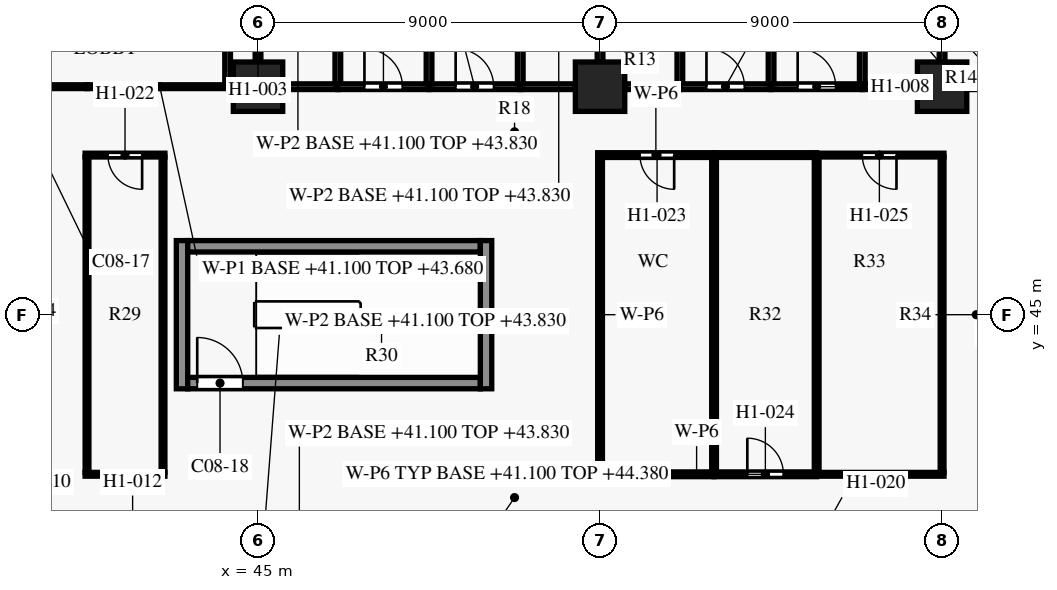
"""IFC4 building model, lengths in metres.
Left out: names, types, materials, properties, quantities, classifications, styles, units other than length and angle.
Written with IfcOpenShell. Run it as: python <this file> out.ifc"""

import sys

from ifc_helpers import new_model, si_unit, direction, frame, frame_2d, origin, origin_2d, place, context, subcontext, project, spatial, rectangle, extrude, element, fill, save


model = new_model("IFC4")
c1 = context("Model", 3, precision=1e-05, world=origin(), true_north=direction((0.0, 1.0)))
c2 = subcontext(c1, "Body", "Model", "MODEL_VIEW")
j1 = project(units=[si_unit("LENGTHUNIT", "METRE"), si_unit("PLANEANGLEUNIT", "RADIAN")], contexts=[c1])
p1 = place(None, origin())
s1 = spatial("IfcSite", under=j1, at=p1, CompositionType="ELEMENT")
p2 = place(p1, origin())
s2 = spatial("IfcBuilding", under=s1, at=p2, CompositionType="ELEMENT")
p3 = place(p2, frame((0.0, 0.0, 41.1)))
s3 = spatial("IfcBuildingStorey", under=s2, at=p3, CompositionType="ELEMENT", Elevation=41.1)
for number, where, z_axis, x_axis in (
    (1, (45.0, 51.0, 0.0), (0.0, 0.0, 1.0), (1.0, 0.0, 0.0)),
    (2, (54.0, 51.0, 0.0), (0.0, 0.0, 1.0), (1.0, 0.0, 0.0)),
    (3, (63.0, 51.0, 0.0), (0.0, 0.0, 1.0), (1.0, 0.0, 0.0)),
):
    element("IfcColumn", number, at=place(p3, frame(where, z_axis=z_axis, x_axis=x_axis)), inside=s3, PredefinedType="COLUMN", context=c2, shape_type="SweptSolid", body=[
        extrude(rectangle(XDim=1.3, YDim=1.3, at=origin_2d()), origin(), (0.0, 0.0, 1.0), 3.6),
    ])
p4 = place(p3, frame((43.15, 43.2, 0.0), z_axis=(0.0, 0.0, 1.0), x_axis=(1.0, 0.0, 0.0)))
e4 = element("IfcWall", 4, at=p4, inside=s3, PredefinedType="SHEAR", context=c2, shape_type="SweptSolid", body=[
    extrude(rectangle(XDim=7.7, YDim=0.3, at=frame_2d((3.85, 0.0))), origin(), (0.0, 0.0, 1.0), 3.3),
])
p5 = place(p4, frame((0.25, 0.0, 0.0)))
e5 = element("IfcOpeningElement", 5, at=p5, cuts=e4, PredefinedType="OPENING", context=c2, shape_type="SweptSolid", body=[
    extrude(rectangle(XDim=1.2, YDim=2.2, at=frame_2d((0.6, 1.1))), frame((0.0, 0.16, 0.0), z_axis=(0.0, -1.0, 0.0), x_axis=(1.0, 0.0, 0.0)), (0.0, 0.0, 1.0), 0.32),
])
p6 = place(p3, frame((43.15, 46.8, 0.0), z_axis=(0.0, 0.0, 1.0), x_axis=(1.0, 0.0, 0.0)))
e6 = element("IfcWall", 6, at=p6, inside=s3, PredefinedType="SHEAR", context=c2, shape_type="SweptSolid", body=[
    extrude(rectangle(XDim=7.7, YDim=0.3, at=frame_2d((3.85, 0.0))), origin(), (0.0, 0.0, 1.0), 3.3),
])
for number, where, z_axis, x_axis in (
    (7, (43.0, 43.05, 0.0), (0.0, 0.0, 1.0), (0.0, 1.0, 0.0)),
    (8, (51.0, 43.05, 0.0), (0.0, 0.0, 1.0), (0.0, 1.0, 0.0)),
):
    element("IfcWall", number, at=place(p3, frame(where, z_axis=z_axis, x_axis=x_axis)), inside=s3, PredefinedType="SHEAR", context=c2, shape_type="SweptSolid", body=[
        extrude(rectangle(XDim=3.9, YDim=0.3, at=frame_2d((1.95, 0.0))), origin(), (0.0, 0.0, 1.0), 3.3),
    ])
p7 = place(p3, frame((40.45, 40.8, 0.0), z_axis=(0.0, 0.0, 1.0), x_axis=(1.0, 0.0, 0.0)))
e9 = element("IfcWall", 9, at=p7, inside=s3, PredefinedType="PARTITIONING", context=c2, shape_type="SweptSolid", body=[
    extrude(rectangle(XDim=2.1, YDim=0.1, at=frame_2d((1.05, 0.0))), origin(), (0.0, 0.0, 1.0), 3.28),
])
p8 = place(p3, frame((53.938, 40.8, 0.0), z_axis=(0.0, 0.0, 1.0), x_axis=(1.0, 0.0, 0.0)))
e10 = element("IfcWall", 10, at=p8, inside=s3, PredefinedType="PARTITIONING", context=c2, shape_type="SweptSolid", body=[
    extrude(rectangle(XDim=3.062, YDim=0.125, at=frame_2d((1.531, 0.0))), origin(), (0.0, 0.0, 1.0), 2.73),
])
p9 = place(p3, frame((57.0, 40.8, 0.0), z_axis=(0.0, 0.0, 1.0), x_axis=(1.0, 0.0, 0.0)))
e11 = element("IfcWall", 11, at=p9, inside=s3, PredefinedType="PARTITIONING", context=c2, shape_type="SweptSolid", body=[
    extrude(rectangle(XDim=2.7, YDim=0.125, at=frame_2d((1.35, 0.0))), origin(), (0.0, 0.0, 1.0), 3.28),
])
p10 = place(p9, frame((0.875, 0.0, 0.0)))
e12 = element("IfcOpeningElement", 12, at=p10, cuts=e11, PredefinedType="OPENING", context=c2, shape_type="SweptSolid", body=[
    extrude(rectangle(XDim=0.95, YDim=2.1, at=frame_2d((0.475, 1.05))), frame((0.0, 0.073, 0.0), z_axis=(0.0, -1.0, 0.0), x_axis=(1.0, 0.0, 0.0)), (0.0, 0.0, 1.0), 0.145),
])
p11 = place(p3, frame((59.7, 40.8, 0.0), z_axis=(0.0, 0.0, 1.0), x_axis=(1.0, 0.0, 0.0)))
e13 = element("IfcWall", 13, at=p11, inside=s3, PredefinedType="PARTITIONING", context=c2, shape_type="SweptSolid", body=[
    extrude(rectangle(XDim=3.35, YDim=0.1, at=frame_2d((1.675, 0.0))), origin(), (0.0, 0.0, 1.0), 2.73),
])
p12 = place(p3, frame((63.0, 40.85, 0.0), z_axis=(0.0, 0.0, 1.0), x_axis=(0.0, 1.0, 0.0)))
e14 = element("IfcWall", 14, at=p12, inside=s3, PredefinedType="PARTITIONING", context=c2, shape_type="SweptSolid", body=[
    extrude(rectangle(XDim=8.3, YDim=0.1, at=frame_2d((4.15, 0.0))), origin(), (0.0, 0.0, 1.0), 2.73),
])
p13 = place(p3, frame((54.0, 49.137, 0.0), z_axis=(0.0, 0.0, 1.0), x_axis=(0.0, -1.0, 0.0)))
e15 = element("IfcWall", 15, at=p13, inside=s3, PredefinedType="PARTITIONING", context=c2, shape_type="SweptSolid", body=[
    extrude(rectangle(XDim=8.275, YDim=0.125, at=frame_2d((4.137, 0.0))), origin(), (0.0, 0.0, 1.0), 2.73),
])
for number, where, z_axis, x_axis in (
    (16, (57.0, 49.137, 0.0), (0.0, 0.0, 1.0), (0.0, -1.0, 0.0)),
    (17, (59.7, 49.137, 0.0), (0.0, 0.0, 1.0), (0.0, -1.0, 0.0)),
):
    element("IfcWall", number, at=place(p3, frame(where, z_axis=z_axis, x_axis=x_axis)), inside=s3, PredefinedType="PARTITIONING", context=c2, shape_type="SweptSolid", body=[
        extrude(rectangle(XDim=8.275, YDim=0.125, at=frame_2d((4.137, 0.0))), origin(), (0.0, 0.0, 1.0), 3.28),
    ])
for number, where, z_axis, x_axis in (
    (18, (40.5, 49.15, 0.0), (0.0, 0.0, 1.0), (0.0, -1.0, 0.0)),
    (19, (42.5, 49.15, 0.0), (0.0, 0.0, 1.0), (0.0, -1.0, 0.0)),
):
    element("IfcWall", number, at=place(p3, frame(where, z_axis=z_axis, x_axis=x_axis)), inside=s3, PredefinedType="PARTITIONING", context=c2, shape_type="SweptSolid", body=[
        extrude(rectangle(XDim=8.3, YDim=0.1, at=frame_2d((4.15, 0.0))), origin(), (0.0, 0.0, 1.0), 3.28),
    ])
p14 = place(p3, frame((42.55, 49.2, 0.0), z_axis=(0.0, 0.0, 1.0), x_axis=(-1.0, 0.0, 0.0)))
e20 = element("IfcWall", 20, at=p14, inside=s3, PredefinedType="PARTITIONING", context=c2, shape_type="SweptSolid", body=[
    extrude(rectangle(XDim=2.1, YDim=0.1, at=frame_2d((1.05, 0.0))), origin(), (0.0, 0.0, 1.0), 3.28),
])
p15 = place(p14, frame((0.6, 0.0, 0.0)))
e21 = element("IfcOpeningElement", 21, at=p15, cuts=e20, PredefinedType="OPENING", context=c2, shape_type="SweptSolid", body=[
    extrude(rectangle(XDim=0.9, YDim=2.1, at=frame_2d((0.45, 1.05))), frame((0.0, 0.06, 0.0), z_axis=(0.0, -1.0, 0.0), x_axis=(1.0, 0.0, 0.0)), (0.0, 0.0, 1.0), 0.12),
])
p16 = place(p3, frame((57.0, 49.2, 0.0), z_axis=(0.0, 0.0, 1.0), x_axis=(-1.0, 0.0, 0.0)))
e22 = element("IfcWall", 22, at=p16, inside=s3, PredefinedType="PARTITIONING", context=c2, shape_type="SweptSolid", body=[
    extrude(rectangle(XDim=3.062, YDim=0.125, at=frame_2d((1.531, 0.0))), origin(), (0.0, 0.0, 1.0), 2.73),
])
p17 = place(p16, frame((1.05, 0.0, 0.0)))
e23 = element("IfcOpeningElement", 23, at=p17, cuts=e22, PredefinedType="OPENING", context=c2, shape_type="SweptSolid", body=[
    extrude(rectangle(XDim=0.9, YDim=2.1, at=frame_2d((0.45, 1.05))), frame((0.0, 0.073, 0.0), z_axis=(0.0, -1.0, 0.0), x_axis=(1.0, 0.0, 0.0)), (0.0, 0.0, 1.0), 0.145),
])
p18 = place(p3, frame((59.7, 49.2, 0.0), z_axis=(0.0, 0.0, 1.0), x_axis=(-1.0, 0.0, 0.0)))
e24 = element("IfcWall", 24, at=p18, inside=s3, PredefinedType="PARTITIONING", context=c2, shape_type="SweptSolid", body=[
    extrude(rectangle(XDim=2.7, YDim=0.125, at=frame_2d((1.35, 0.0))), origin(), (0.0, 0.0, 1.0), 3.28),
])
p19 = place(p3, frame((63.05, 49.2, 0.0), z_axis=(0.0, 0.0, 1.0), x_axis=(-1.0, 0.0, 0.0)))
e25 = element("IfcWall", 25, at=p19, inside=s3, PredefinedType="PARTITIONING", context=c2, shape_type="SweptSolid", body=[
    extrude(rectangle(XDim=3.35, YDim=0.1, at=frame_2d((1.675, 0.0))), origin(), (0.0, 0.0, 1.0), 2.73),
])
p20 = place(p19, frame((1.25, 0.0, 0.0)))
e26 = element("IfcOpeningElement", 26, at=p20, cuts=e25, PredefinedType="OPENING", context=c2, shape_type="SweptSolid", body=[
    extrude(rectangle(XDim=0.9, YDim=2.1, at=frame_2d((0.45, 1.05))), frame((0.0, 0.06, 0.0), z_axis=(0.0, -1.0, 0.0), x_axis=(1.0, 0.0, 0.0)), (0.0, 0.0, 1.0), 0.12),
])
p21 = place(p3, frame((40.5, 51.0, 0.0), z_axis=(0.0, 0.0, 1.0), x_axis=(-1.0, 0.0, 0.0)))
e27 = element("IfcWall", 27, at=p21, inside=s3, PredefinedType="PARTITIONING", context=c2, shape_type="SweptSolid", body=[
    extrude(rectangle(XDim=3.845, YDim=0.1, at=frame_2d((1.922, 0.0))), origin(), (0.0, 0.0, 1.0), 2.58),
])
p22 = place(p21, frame((1.8, 0.0, 0.0)))
e28 = element("IfcOpeningElement", 28, at=p22, cuts=e27, PredefinedType="OPENING", context=c2, shape_type="SweptSolid", body=[
    extrude(rectangle(XDim=0.9, YDim=2.1, at=frame_2d((0.45, 1.05))), frame((0.0, 0.06, 0.0), z_axis=(0.0, -1.0, 0.0), x_axis=(1.0, 0.0, 0.0)), (0.0, 0.0, 1.0), 0.12),
])
p23 = place(p3, frame((44.33, 51.0, 0.0), z_axis=(0.0, 0.0, 1.0), x_axis=(-1.0, 0.0, 0.0)))
e29 = element("IfcWall", 29, at=p23, inside=s3, PredefinedType="PARTITIONING", context=c2, shape_type="SweptSolid", body=[
    extrude(rectangle(XDim=3.83, YDim=0.1, at=frame_2d((1.915, 0.0))), origin(), (0.0, 0.0, 1.0), 2.58),
])
p24 = place(p3, frame((45.655, 51.0, 0.0), z_axis=(0.0, 0.0, 1.0), x_axis=(1.0, 0.0, 0.0)))
e30 = element("IfcWall", 30, at=p24, inside=s3, PredefinedType="PARTITIONING", context=c2, shape_type="SweptSolid", body=[
    extrude(rectangle(XDim=1.445, YDim=0.15, at=frame_2d((0.723, 0.0))), origin(), (0.0, 0.0, 1.0), 2.58),
])
p25 = place(p3, frame((47.1, 51.0, 0.0), z_axis=(0.0, 0.0, 1.0), x_axis=(1.0, 0.0, 0.0)))
e31 = element("IfcWall", 31, at=p25, inside=s3, PredefinedType="PARTITIONING", context=c2, shape_type="SweptSolid", body=[
    extrude(rectangle(XDim=2.4, YDim=0.15, at=frame_2d((1.2, 0.0))), origin(), (0.0, 0.0, 1.0), 2.58),
])
p26 = place(p25, frame((0.7, 0.0, 0.0)))
e32 = element("IfcOpeningElement", 32, at=p26, cuts=e31, PredefinedType="OPENING", context=c2, shape_type="SweptSolid", body=[
    extrude(rectangle(XDim=1.0, YDim=2.1, at=frame_2d((0.5, 1.05))), frame((0.0, 0.085, 0.0), z_axis=(0.0, -1.0, 0.0), x_axis=(1.0, 0.0, 0.0)), (0.0, 0.0, 1.0), 0.17),
])
p27 = place(p3, frame((49.5, 51.0, 0.0), z_axis=(0.0, 0.0, 1.0), x_axis=(1.0, 0.0, 0.0)))
e33 = element("IfcWall", 33, at=p27, inside=s3, PredefinedType="PARTITIONING", context=c2, shape_type="SweptSolid", body=[
    extrude(rectangle(XDim=2.4, YDim=0.15, at=frame_2d((1.2, 0.0))), origin(), (0.0, 0.0, 1.0), 2.58),
])
p28 = place(p27, frame((0.7, 0.0, 0.0)))
e34 = element("IfcOpeningElement", 34, at=p28, cuts=e33, PredefinedType="OPENING", context=c2, shape_type="SweptSolid", body=[
    extrude(rectangle(XDim=1.0, YDim=2.1, at=frame_2d((0.5, 1.05))), frame((0.0, 0.085, 0.0), z_axis=(0.0, -1.0, 0.0), x_axis=(1.0, 0.0, 0.0)), (0.0, 0.0, 1.0), 0.17),
])
for number, where, z_axis, x_axis in (
    (35, (51.9, 51.0, 0.0), (0.0, 0.0, 1.0), (1.0, 0.0, 0.0)),
    (36, (54.655, 51.0, 0.0), (0.0, 0.0, 1.0), (1.0, 0.0, 0.0)),
):
    element("IfcWall", number, at=place(p3, frame(where, z_axis=z_axis, x_axis=x_axis)), inside=s3, PredefinedType="PARTITIONING", context=c2, shape_type="SweptSolid", body=[
        extrude(rectangle(XDim=1.445, YDim=0.15, at=frame_2d((0.723, 0.0))), origin(), (0.0, 0.0, 1.0), 2.58),
    ])
p29 = place(p3, frame((56.1, 51.0, 0.0), z_axis=(0.0, 0.0, 1.0), x_axis=(1.0, 0.0, 0.0)))
e37 = element("IfcWall", 37, at=p29, inside=s3, PredefinedType="PARTITIONING", context=c2, shape_type="SweptSolid", body=[
    extrude(rectangle(XDim=2.4, YDim=0.15, at=frame_2d((1.2, 0.0))), origin(), (0.0, 0.0, 1.0), 2.58),
])
p30 = place(p29, frame((0.7, 0.0, 0.0)))
e38 = element("IfcOpeningElement", 38, at=p30, cuts=e37, PredefinedType="OPENING", context=c2, shape_type="SweptSolid", body=[
    extrude(rectangle(XDim=1.0, YDim=2.1, at=frame_2d((0.5, 1.05))), frame((0.0, 0.085, 0.0), z_axis=(0.0, -1.0, 0.0), x_axis=(1.0, 0.0, 0.0)), (0.0, 0.0, 1.0), 0.17),
])
p31 = place(p3, frame((58.5, 51.0, 0.0), z_axis=(0.0, 0.0, 1.0), x_axis=(1.0, 0.0, 0.0)))
e39 = element("IfcWall", 39, at=p31, inside=s3, PredefinedType="PARTITIONING", context=c2, shape_type="SweptSolid", body=[
    extrude(rectangle(XDim=2.4, YDim=0.15, at=frame_2d((1.2, 0.0))), origin(), (0.0, 0.0, 1.0), 2.58),
])
p32 = place(p31, frame((0.7, 0.0, 0.0)))
e40 = element("IfcOpeningElement", 40, at=p32, cuts=e39, PredefinedType="OPENING", context=c2, shape_type="SweptSolid", body=[
    extrude(rectangle(XDim=1.0, YDim=2.1, at=frame_2d((0.5, 1.05))), frame((0.0, 0.085, 0.0), z_axis=(0.0, -1.0, 0.0), x_axis=(1.0, 0.0, 0.0)), (0.0, 0.0, 1.0), 0.17),
])
p33 = place(p3, frame((60.9, 51.0, 0.0), z_axis=(0.0, 0.0, 1.0), x_axis=(1.0, 0.0, 0.0)))
e41 = element("IfcWall", 41, at=p33, inside=s3, PredefinedType="PARTITIONING", context=c2, shape_type="SweptSolid", body=[
    extrude(rectangle(XDim=1.445, YDim=0.15, at=frame_2d((0.723, 0.0))), origin(), (0.0, 0.0, 1.0), 2.58),
])
p34 = place(p3, frame((63.655, 51.0, 0.0), z_axis=(0.0, 0.0, 1.0), x_axis=(1.0, 0.0, 0.0)))
e42 = element("IfcWall", 42, at=p34, inside=s3, PredefinedType="PARTITIONING", context=c2, shape_type="SweptSolid", body=[
    extrude(rectangle(XDim=1.22, YDim=0.15, at=frame_2d((0.61, 0.0))), origin(), (0.0, 0.0, 1.0), 2.58),
])
p35 = place(p3, frame((47.1, 51.075, 0.0), z_axis=(0.0, 0.0, 1.0), x_axis=(0.0, 1.0, 0.0)))
e43 = element("IfcWall", 43, at=p35, inside=s3, PredefinedType="PARTITIONING", context=c2, shape_type="SweptSolid", body=[
    extrude(rectangle(XDim=2.85, YDim=0.15, at=frame_2d((1.425, 0.0))), origin(), (0.0, 0.0, 1.0), 2.58),
])
p36 = place(p3, frame((56.1, 51.075, 0.0), z_axis=(0.0, 0.0, 1.0), x_axis=(0.0, 1.0, 0.0)))
e44 = element("IfcWall", 44, at=p36, inside=s3, PredefinedType="PARTITIONING", context=c2, shape_type="SweptSolid", body=[
    extrude(rectangle(XDim=2.85, YDim=0.15, at=frame_2d((1.425, 0.0))), origin(), (0.0, 0.0, 1.0), 2.58),
])
p37 = place(p36, frame((1.025, 0.0, 0.0)))
e45 = element("IfcOpeningElement", 45, at=p37, cuts=e44, PredefinedType="OPENING", context=c2, shape_type="SweptSolid", body=[
    extrude(rectangle(XDim=0.8, YDim=2.1, at=frame_2d((0.4, 1.05))), frame((0.0, 0.085, 0.0), z_axis=(0.0, -1.0, 0.0), x_axis=(1.0, 0.0, 0.0)), (0.0, 0.0, 1.0), 0.17),
])
p38 = place(p3, frame((44.2, 53.7, 0.0), z_axis=(0.0, 0.0, 1.0), x_axis=(0.0, -1.0, 0.0)))
e46 = element("IfcWall", 46, at=p38, inside=s3, PredefinedType="PARTITIONING", context=c2, shape_type="SweptSolid", body=[
    extrude(rectangle(XDim=2.625, YDim=0.15, at=frame_2d((1.312, 0.0))), origin(), (0.0, 0.0, 1.0), 2.58),
])
p39 = place(p3, frame((45.0, 53.925, 0.0), z_axis=(0.0, 0.0, 1.0), x_axis=(0.0, -1.0, 0.0)))
e47 = element("IfcWall", 47, at=p39, inside=s3, PredefinedType="PARTITIONING", context=c2, shape_type="SweptSolid", body=[
    extrude(rectangle(XDim=2.27, YDim=0.15, at=frame_2d((1.135, 0.0))), origin(), (0.0, 0.0, 1.0), 2.73),
])
p40 = place(p39, frame((1.025, 0.0, 0.0)))
e48 = element("IfcOpeningElement", 48, at=p40, cuts=e47, PredefinedType="OPENING", context=c2, shape_type="SweptSolid", body=[
    extrude(rectangle(XDim=0.8, YDim=2.1, at=frame_2d((0.4, 1.05))), frame((0.0, 0.085, 0.0), z_axis=(0.0, -1.0, 0.0), x_axis=(1.0, 0.0, 0.0)), (0.0, 0.0, 1.0), 0.17),
])
p41 = place(p3, frame((51.9, 53.925, 0.0), z_axis=(0.0, 0.0, 1.0), x_axis=(0.0, -1.0, 0.0)))
e49 = element("IfcWall", 49, at=p41, inside=s3, PredefinedType="PARTITIONING", context=c2, shape_type="SweptSolid", body=[
    extrude(rectangle(XDim=2.85, YDim=0.15, at=frame_2d((1.425, 0.0))), origin(), (0.0, 0.0, 1.0), 2.58),
])
p42 = place(p41, frame((1.025, 0.0, 0.0)))
e50 = element("IfcOpeningElement", 50, at=p42, cuts=e49, PredefinedType="OPENING", context=c2, shape_type="SweptSolid", body=[
    extrude(rectangle(XDim=0.8, YDim=2.1, at=frame_2d((0.4, 1.05))), frame((0.0, 0.085, 0.0), z_axis=(0.0, -1.0, 0.0), x_axis=(1.0, 0.0, 0.0)), (0.0, 0.0, 1.0), 0.17),
])
p43 = place(p3, frame((54.0, 53.925, 0.0), z_axis=(0.0, 0.0, 1.0), x_axis=(0.0, -1.0, 0.0)))
e51 = element("IfcWall", 51, at=p43, inside=s3, PredefinedType="PARTITIONING", context=c2, shape_type="SweptSolid", body=[
    extrude(rectangle(XDim=2.27, YDim=0.15, at=frame_2d((1.135, 0.0))), origin(), (0.0, 0.0, 1.0), 2.73),
])
p44 = place(p3, frame((60.9, 53.925, 0.0), z_axis=(0.0, 0.0, 1.0), x_axis=(0.0, -1.0, 0.0)))
e52 = element("IfcWall", 52, at=p44, inside=s3, PredefinedType="PARTITIONING", context=c2, shape_type="SweptSolid", body=[
    extrude(rectangle(XDim=2.85, YDim=0.15, at=frame_2d((1.425, 0.0))), origin(), (0.0, 0.0, 1.0), 2.58),
])
p45 = place(p44, frame((1.025, 0.0, 0.0)))
e53 = element("IfcOpeningElement", 53, at=p45, cuts=e52, PredefinedType="OPENING", context=c2, shape_type="SweptSolid", body=[
    extrude(rectangle(XDim=0.8, YDim=2.1, at=frame_2d((0.4, 1.05))), frame((0.0, 0.085, 0.0), z_axis=(0.0, -1.0, 0.0), x_axis=(1.0, 0.0, 0.0)), (0.0, 0.0, 1.0), 0.17),
])
p46 = place(p3, frame((63.0, 53.925, 0.0), z_axis=(0.0, 0.0, 1.0), x_axis=(0.0, -1.0, 0.0)))
e54 = element("IfcWall", 54, at=p46, inside=s3, PredefinedType="PARTITIONING", context=c2, shape_type="SweptSolid", body=[
    extrude(rectangle(XDim=2.27, YDim=0.15, at=frame_2d((1.135, 0.0))), origin(), (0.0, 0.0, 1.0), 2.73),
])
for number, where, z_axis, x_axis in (
    (55, (49.5, 62.425, 0.0), (0.0, 0.0, 1.0), (0.0, -1.0, 0.0)),
    (56, (58.5, 62.425, 0.0), (0.0, 0.0, 1.0), (0.0, -1.0, 0.0)),
):
    element("IfcWall", number, at=place(p3, frame(where, z_axis=z_axis, x_axis=x_axis)), inside=s3, PredefinedType="PARTITIONING", context=c2, shape_type="SweptSolid", body=[
        extrude(rectangle(XDim=11.35, YDim=0.15, at=frame_2d((5.675, 0.0))), origin(), (0.0, 0.0, 1.0), 2.58),
    ])
p47 = place(p5, origin())
e57 = element("IfcDoor", 57, at=p47, inside=s3, OperationType="SINGLE_SWING_RIGHT", PredefinedType="DOOR", context=c2, shape_type="SweptSolid", body=[
    extrude(rectangle(XDim=1.2, YDim=2.2, at=frame_2d((0.6, 1.1))), frame((0.0, 0.025, 0.0), z_axis=(0.0, -1.0, 0.0), x_axis=(1.0, 0.0, 0.0)), (0.0, 0.0, 1.0), 0.05),
])
fill(e5, e57)
p48 = place(p26, origin())
e58 = element("IfcDoor", 58, at=p48, inside=s3, OperationType="SINGLE_SWING_LEFT", PredefinedType="DOOR", context=c2, shape_type="SweptSolid", body=[
    extrude(rectangle(XDim=1.0, YDim=2.1, at=frame_2d((0.5, 1.05))), frame((0.0, 0.025, 0.0), z_axis=(0.0, -1.0, 0.0), x_axis=(1.0, 0.0, 0.0)), (0.0, 0.0, 1.0), 0.05),
])
fill(e32, e58)
p49 = place(p28, origin())
e59 = element("IfcDoor", 59, at=p49, inside=s3, OperationType="SINGLE_SWING_LEFT", PredefinedType="DOOR", context=c2, shape_type="SweptSolid", body=[
    extrude(rectangle(XDim=1.0, YDim=2.1, at=frame_2d((0.5, 1.05))), frame((0.0, 0.025, 0.0), z_axis=(0.0, -1.0, 0.0), x_axis=(1.0, 0.0, 0.0)), (0.0, 0.0, 1.0), 0.05),
])
fill(e34, e59)
p50 = place(p30, origin())
e60 = element("IfcDoor", 60, at=p50, inside=s3, OperationType="SINGLE_SWING_LEFT", PredefinedType="DOOR", context=c2, shape_type="SweptSolid", body=[
    extrude(rectangle(XDim=1.0, YDim=2.1, at=frame_2d((0.5, 1.05))), frame((0.0, 0.025, 0.0), z_axis=(0.0, -1.0, 0.0), x_axis=(1.0, 0.0, 0.0)), (0.0, 0.0, 1.0), 0.05),
])
fill(e38, e60)
p51 = place(p32, origin())
e61 = element("IfcDoor", 61, at=p51, inside=s3, OperationType="SINGLE_SWING_LEFT", PredefinedType="DOOR", context=c2, shape_type="SweptSolid", body=[
    extrude(rectangle(XDim=1.0, YDim=2.1, at=frame_2d((0.5, 1.05))), frame((0.0, 0.025, 0.0), z_axis=(0.0, -1.0, 0.0), x_axis=(1.0, 0.0, 0.0)), (0.0, 0.0, 1.0), 0.05),
])
fill(e40, e61)
p52 = place(p15, origin())
e62 = element("IfcDoor", 62, at=p52, inside=s3, OperationType="SINGLE_SWING_LEFT", PredefinedType="DOOR", context=c2, shape_type="SweptSolid", body=[
    extrude(rectangle(XDim=0.9, YDim=2.1, at=frame_2d((0.45, 1.05))), frame((0.0, 0.025, 0.0), z_axis=(0.0, -1.0, 0.0), x_axis=(1.0, 0.0, 0.0)), (0.0, 0.0, 1.0), 0.05),
])
fill(e21, e62)
p53 = place(p17, origin())
e63 = element("IfcDoor", 63, at=p53, inside=s3, OperationType="SINGLE_SWING_LEFT", PredefinedType="DOOR", context=c2, shape_type="SweptSolid", body=[
    extrude(rectangle(XDim=0.9, YDim=2.1, at=frame_2d((0.45, 1.05))), frame((0.0, 0.025, 0.0), z_axis=(0.0, -1.0, 0.0), x_axis=(1.0, 0.0, 0.0)), (0.0, 0.0, 1.0), 0.05),
])
fill(e23, e63)
p54 = place(p10, origin())
e64 = element("IfcDoor", 64, at=p54, inside=s3, OperationType="SINGLE_SWING_LEFT", PredefinedType="DOOR", context=c2, shape_type="SweptSolid", body=[
    extrude(rectangle(XDim=0.95, YDim=2.1, at=frame_2d((0.475, 1.05))), frame((0.0, 0.025, 0.0), z_axis=(0.0, -1.0, 0.0), x_axis=(1.0, 0.0, 0.0)), (0.0, 0.0, 1.0), 0.05),
])
fill(e12, e64)
p55 = place(p20, origin())
e65 = element("IfcDoor", 65, at=p55, inside=s3, OperationType="SINGLE_SWING_LEFT", PredefinedType="DOOR", context=c2, shape_type="SweptSolid", body=[
    extrude(rectangle(XDim=0.9, YDim=2.1, at=frame_2d((0.45, 1.05))), frame((0.0, 0.025, 0.0), z_axis=(0.0, -1.0, 0.0), x_axis=(1.0, 0.0, 0.0)), (0.0, 0.0, 1.0), 0.05),
])
fill(e26, e65)
save(model, sys.argv[1])
